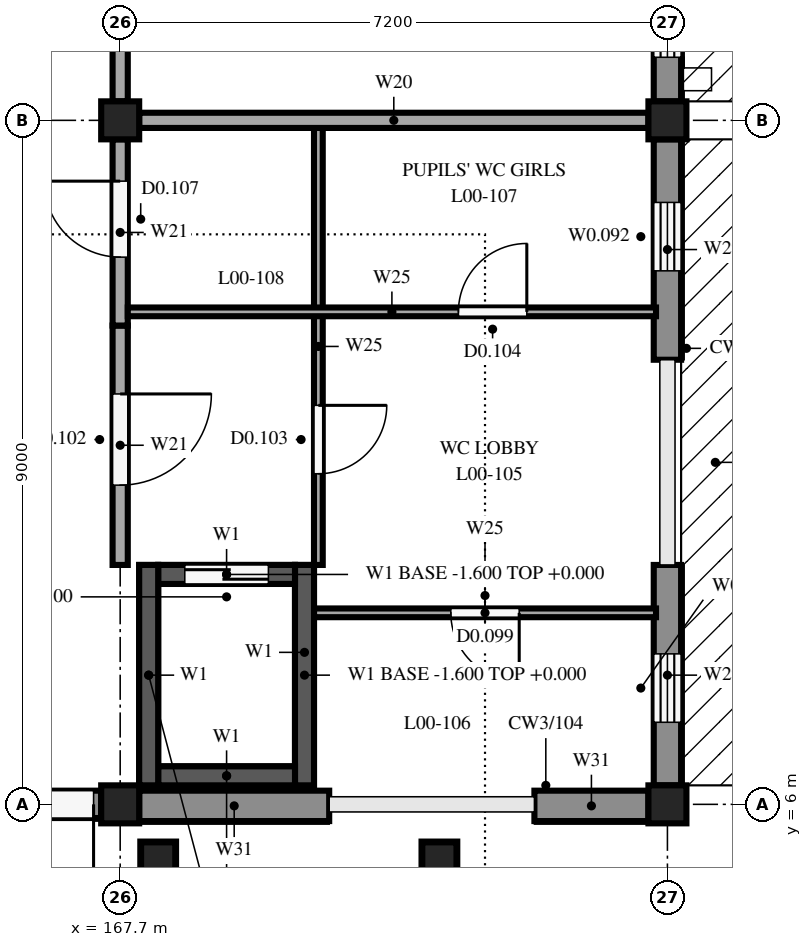
"""IFC4 building model, lengths in metres.
Left out: names, types, materials, properties, quantities, classifications, styles, units other than length and angle.
Written with IfcOpenShell. Run it as: python <this file> out.ifc"""

import sys

from ifc_helpers import new_model, si_unit, direction, frame, frame_2d, origin, origin_2d, place, context, subcontext, project, spatial, rectangle, extrude, element, fill, save


model = new_model("IFC4")
c1 = context("Model", 3, precision=1e-05, world=origin(), true_north=direction((0.0, 1.0)))
c2 = subcontext(c1, "Body", "Model", "MODEL_VIEW")
j1 = project(units=[si_unit("LENGTHUNIT", "METRE"), si_unit("PLANEANGLEUNIT", "RADIAN")], contexts=[c1])
p1 = place(None, origin())
s1 = spatial("IfcSite", under=j1, at=p1, CompositionType="ELEMENT")
p2 = place(p1, origin())
s2 = spatial("IfcBuilding", under=s1, at=p2, CompositionType="ELEMENT")
p3 = place(p2, origin())
s3 = spatial("IfcBuildingStorey", under=s2, at=p3, CompositionType="ELEMENT", Elevation=0.0)
for number, where, z_axis, x_axis in (
    (1, (167.7, 6.0, 0.0), (0.0, 0.0, 1.0), (1.0, 0.0, 0.0)),
    (2, (167.7, 15.0, 0.0), (0.0, 0.0, 1.0), (1.0, 0.0, 0.0)),
    (3, (174.9, 6.0, 0.0), (0.0, 0.0, 1.0), (1.0, 0.0, 0.0)),
    (4, (174.9, 15.0, 0.0), (0.0, 0.0, 1.0), (1.0, 0.0, 0.0)),
):
    element("IfcColumn", number, at=place(p3, frame(where, z_axis=z_axis, x_axis=x_axis)), inside=s3, PredefinedType="COLUMN", context=c2, shape_type="SweptSolid", body=[
        extrude(rectangle(XDim=0.5, YDim=0.5, at=origin_2d()), origin(), (0.0, 0.0, 1.0), 4.25),
    ])
for number, where, z_axis, x_axis in (
    (5, (168.075, 6.25, 0.0), (0.0, 0.0, 1.0), (0.0, 1.0, 0.0)),
    (6, (170.125, 6.25, 0.0), (0.0, 0.0, 1.0), (0.0, 1.0, 0.0)),
):
    element("IfcWall", number, at=place(p3, frame(where, z_axis=z_axis, x_axis=x_axis)), inside=s3, PredefinedType="SHEAR", context=c2, shape_type="SweptSolid", body=[
        extrude(rectangle(XDim=2.9, YDim=0.25, at=frame_2d((1.45, 0.0))), origin(), (0.0, 0.0, 1.0), 4.25),
    ])
p4 = place(p3, frame((168.2, 6.375, 0.0), z_axis=(0.0, 0.0, 1.0), x_axis=(1.0, 0.0, 0.0)))
e7 = element("IfcWall", 7, at=p4, inside=s3, PredefinedType="SHEAR", context=c2, shape_type="SweptSolid", body=[
    extrude(rectangle(XDim=1.8, YDim=0.25, at=frame_2d((0.9, 0.0))), origin(), (0.0, 0.0, 1.0), 4.25),
])
p5 = place(p3, frame((168.2, 9.025, 0.0), z_axis=(0.0, 0.0, 1.0), x_axis=(1.0, 0.0, 0.0)))
e8 = element("IfcWall", 8, at=p5, inside=s3, PredefinedType="SHEAR", context=c2, shape_type="SweptSolid", body=[
    extrude(rectangle(XDim=1.8, YDim=0.25, at=frame_2d((0.9, 0.0))), origin(), (0.0, 0.0, 1.0), 4.25),
])
p6 = place(p5, frame((0.35, 0.0, 0.0)))
e9 = element("IfcOpeningElement", 9, at=p6, cuts=e8, PredefinedType="OPENING", context=c2, shape_type="SweptSolid", body=[
    extrude(rectangle(XDim=1.1, YDim=2.1, at=frame_2d((0.55, 1.05))), frame((0.0, 0.135, 0.0), z_axis=(0.0, -1.0, 0.0), x_axis=(1.0, 0.0, 0.0)), (0.0, 0.0, 1.0), 0.27),
])
for number, where, z_axis, x_axis in (
    (10, (168.075, 6.25, -1.6), (0.0, 0.0, 1.0), (0.0, 1.0, 0.0)),
    (11, (170.125, 6.25, -1.6), (0.0, 0.0, 1.0), (0.0, 1.0, 0.0)),
):
    element("IfcWall", number, at=place(p3, frame(where, z_axis=z_axis, x_axis=x_axis)), inside=s3, PredefinedType="SHEAR", context=c2, shape_type="SweptSolid", body=[
        extrude(rectangle(XDim=2.9, YDim=0.25, at=frame_2d((1.45, 0.0))), origin(), (0.0, 0.0, 1.0), 1.6),
    ])
for number, where, z_axis, x_axis in (
    (12, (168.2, 6.375, -1.6), (0.0, 0.0, 1.0), (1.0, 0.0, 0.0)),
    (13, (168.2, 9.025, -1.6), (0.0, 0.0, 1.0), (1.0, 0.0, 0.0)),
):
    element("IfcWall", number, at=place(p3, frame(where, z_axis=z_axis, x_axis=x_axis)), inside=s3, PredefinedType="SHEAR", context=c2, shape_type="SweptSolid", body=[
        extrude(rectangle(XDim=1.8, YDim=0.25, at=frame_2d((0.9, 0.0))), origin(), (0.0, 0.0, 1.0), 1.6),
    ])
for number, where, z_axis, x_axis in (
    (14, (168.2, 5.275, -0.3), (0.0, 0.0, 1.0), (1.0, 0.0, 0.0)),
    (15, (171.9, 5.275, -0.3), (0.0, 0.0, 1.0), (1.0, 0.0, 0.0)),
):
    element("IfcColumn", number, at=place(p3, frame(where, z_axis=z_axis, x_axis=x_axis)), inside=s3, PredefinedType="COLUMN", context=c2, shape_type="SweptSolid", body=[
        extrude(rectangle(XDim=0.45, YDim=0.45, at=origin_2d()), origin(), (0.0, 0.0, 1.0), 3.95),
    ])
p7 = place(p3, frame((174.9, 9.15, 0.0), z_axis=(0.0, 0.0, 1.0), x_axis=(0.0, -1.0, 0.0)))
e16 = element("IfcWall", 16, at=p7, inside=s3, PredefinedType="STANDARD", context=c2, shape_type="SweptSolid", body=[
    extrude(rectangle(XDim=2.9, YDim=0.36, at=frame_2d((1.45, 0.0))), origin(), (0.0, 0.0, 1.0), 3.75),
])
p8 = place(p7, frame((1.17, 0.0, 1.6)))
e17 = element("IfcOpeningElement", 17, at=p8, cuts=e16, PredefinedType="OPENING", context=c2, shape_type="SweptSolid", body=[
    extrude(rectangle(XDim=0.9, YDim=1.0, at=frame_2d((0.45, 0.5))), frame((0.0, 0.19, 0.0), z_axis=(0.0, -1.0, 0.0), x_axis=(1.0, 0.0, 0.0)), (0.0, 0.0, 1.0), 0.38),
])
p9 = place(p3, frame((174.9, 14.75, 0.0), z_axis=(0.0, 0.0, 1.0), x_axis=(0.0, -1.0, 0.0)))
e18 = element("IfcWall", 18, at=p9, inside=s3, PredefinedType="STANDARD", context=c2, shape_type="SweptSolid", body=[
    extrude(rectangle(XDim=2.9, YDim=0.36, at=frame_2d((1.45, 0.0))), origin(), (0.0, 0.0, 1.0), 3.75),
])
p10 = place(p9, frame((0.83, 0.0, 1.6)))
e19 = element("IfcOpeningElement", 19, at=p10, cuts=e18, PredefinedType="OPENING", context=c2, shape_type="SweptSolid", body=[
    extrude(rectangle(XDim=0.9, YDim=1.0, at=frame_2d((0.45, 0.5))), frame((0.0, 0.19, 0.0), z_axis=(0.0, -1.0, 0.0), x_axis=(1.0, 0.0, 0.0)), (0.0, 0.0, 1.0), 0.38),
])
p11 = place(p3, frame((174.9, 23.75, 0.0), z_axis=(0.0, 0.0, 1.0), x_axis=(0.0, -1.0, 0.0)))
e20 = element("IfcWall", 20, at=p11, inside=s3, PredefinedType="STANDARD", context=c2, shape_type="SweptSolid", body=[
    extrude(rectangle(XDim=8.5, YDim=0.36, at=frame_2d((4.25, 0.0))), origin(), (0.0, 0.0, 1.0), 3.75),
])
p12 = place(p11, frame((6.52, 0.0, 0.6)))
e21 = element("IfcOpeningElement", 21, at=p12, cuts=e20, PredefinedType="OPENING", context=c2, shape_type="SweptSolid", body=[
    extrude(rectangle(XDim=1.4, YDim=3.0, at=frame_2d((0.7, 1.5))), frame((0.0, 0.19, 0.0), z_axis=(0.0, -1.0, 0.0), x_axis=(1.0, 0.0, 0.0)), (0.0, 0.0, 1.0), 0.38),
])
p13 = place(p11, frame((4.54, 0.0, 0.6)))
e22 = element("IfcOpeningElement", 22, at=p13, cuts=e20, PredefinedType="OPENING", context=c2, shape_type="SweptSolid", body=[
    extrude(rectangle(XDim=1.4, YDim=3.0, at=frame_2d((0.7, 1.5))), frame((0.0, 0.19, 0.0), z_axis=(0.0, -1.0, 0.0), x_axis=(1.0, 0.0, 0.0)), (0.0, 0.0, 1.0), 0.38),
])
p14 = place(p11, frame((2.56, 0.0, 0.6)))
e23 = element("IfcOpeningElement", 23, at=p14, cuts=e20, PredefinedType="OPENING", context=c2, shape_type="SweptSolid", body=[
    extrude(rectangle(XDim=1.4, YDim=3.0, at=frame_2d((0.7, 1.5))), frame((0.0, 0.19, 0.0), z_axis=(0.0, -1.0, 0.0), x_axis=(1.0, 0.0, 0.0)), (0.0, 0.0, 1.0), 0.38),
])
p15 = place(p11, frame((0.58, 0.0, 0.6)))
e24 = element("IfcOpeningElement", 24, at=p15, cuts=e20, PredefinedType="OPENING", context=c2, shape_type="SweptSolid", body=[
    extrude(rectangle(XDim=1.4, YDim=3.0, at=frame_2d((0.7, 1.5))), frame((0.0, 0.19, 0.0), z_axis=(0.0, -1.0, 0.0), x_axis=(1.0, 0.0, 0.0)), (0.0, 0.0, 1.0), 0.38),
])
p16 = place(p3, frame((167.45, 6.0, 0.0), z_axis=(0.0, 0.0, 1.0), x_axis=(-1.0, 0.0, 0.0)))
e25 = element("IfcWall", 25, at=p16, inside=s3, PredefinedType="STANDARD", context=c2, shape_type="SweptSolid", body=[
    extrude(rectangle(XDim=2.2, YDim=0.36, at=frame_2d((1.1, 0.0))), origin(), (0.0, 0.0, 1.0), 3.9),
])
p17 = place(p16, frame((0.1, 0.0, 0.0)))
e26 = element("IfcOpeningElement", 26, at=p17, cuts=e25, PredefinedType="OPENING", context=c2, shape_type="SweptSolid", body=[
    extrude(rectangle(XDim=2.0, YDim=2.4, at=frame_2d((1.0, 1.2))), frame((0.0, 0.19, 0.0), z_axis=(0.0, -1.0, 0.0), x_axis=(1.0, 0.0, 0.0)), (0.0, 0.0, 1.0), 0.38),
])
p18 = place(p3, frame((170.45, 5.98, 0.0), z_axis=(0.0, 0.0, 1.0), x_axis=(-1.0, 0.0, 0.0)))
e27 = element("IfcWall", 27, at=p18, inside=s3, PredefinedType="STANDARD", context=c2, shape_type="SweptSolid", body=[
    extrude(rectangle(XDim=2.5, YDim=0.4, at=frame_2d((1.25, 0.0))), origin(), (0.0, 0.0, 1.0), 3.8),
])
p19 = place(p3, frame((174.65, 5.98, 0.0), z_axis=(0.0, 0.0, 1.0), x_axis=(-1.0, 0.0, 0.0)))
e28 = element("IfcWall", 28, at=p19, inside=s3, PredefinedType="STANDARD", context=c2, shape_type="SweptSolid", body=[
    extrude(rectangle(XDim=1.5, YDim=0.4, at=frame_2d((0.75, 0.0))), origin(), (0.0, 0.0, 1.0), 3.8),
])
p20 = place(p3, frame((167.7, 12.3, 0.0), z_axis=(0.0, 0.0, 1.0), x_axis=(0.0, -1.0, 0.0)))
e29 = element("IfcWall", 29, at=p20, inside=s3, PredefinedType="PARTITIONING", context=c2, shape_type="SweptSolid", body=[
    extrude(rectangle(XDim=3.15, YDim=0.2, at=frame_2d((1.575, 0.0))), origin(), (0.0, 0.0, 1.0), 3.8),
])
p21 = place(p20, frame((0.9, 0.0, 0.0)))
e30 = element("IfcOpeningElement", 30, at=p21, cuts=e29, PredefinedType="OPENING", context=c2, shape_type="SweptSolid", body=[
    extrude(rectangle(XDim=1.2, YDim=2.1, at=frame_2d((0.6, 1.05))), frame((0.0, 0.11, 0.0), z_axis=(0.0, -1.0, 0.0), x_axis=(1.0, 0.0, 0.0)), (0.0, 0.0, 1.0), 0.22),
])
p22 = place(p3, frame((167.7, 12.3, 0.0), z_axis=(0.0, 0.0, 1.0), x_axis=(0.0, 1.0, 0.0)))
e31 = element("IfcWall", 31, at=p22, inside=s3, PredefinedType="PARTITIONING", context=c2, shape_type="SweptSolid", body=[
    extrude(rectangle(XDim=2.45, YDim=0.2, at=frame_2d((1.225, 0.0))), origin(), (0.0, 0.0, 1.0), 3.8),
])
p23 = place(p22, frame((0.9, 0.0, 0.0)))
e32 = element("IfcOpeningElement", 32, at=p23, cuts=e31, PredefinedType="OPENING", context=c2, shape_type="SweptSolid", body=[
    extrude(rectangle(XDim=1.0, YDim=2.1, at=frame_2d((0.5, 1.05))), frame((0.0, 0.11, 0.0), z_axis=(0.0, -1.0, 0.0), x_axis=(1.0, 0.0, 0.0)), (0.0, 0.0, 1.0), 0.22),
])
p24 = place(p3, frame((167.95, 15.0, 0.0), z_axis=(0.0, 0.0, 1.0), x_axis=(1.0, 0.0, 0.0)))
e33 = element("IfcWall", 33, at=p24, inside=s3, PredefinedType="PARTITIONING", context=c2, shape_type="SweptSolid", body=[
    extrude(rectangle(XDim=6.7, YDim=0.2, at=frame_2d((3.35, 0.0))), origin(), (0.0, 0.0, 1.0), 3.8),
])
p25 = place(p3, frame((170.308, 14.9, 0.0), z_axis=(0.0, 0.0, 1.0), x_axis=(0.0, -1.0, 0.0)))
e34 = element("IfcWall", 34, at=p25, inside=s3, PredefinedType="PARTITIONING", context=c2, shape_type="SweptSolid", body=[
    extrude(rectangle(XDim=5.75, YDim=0.115, at=frame_2d((2.875, 0.0))), origin(), (0.0, 0.0, 1.0), 4.25),
])
p26 = place(p25, frame((3.65, 0.0, 0.0)))
e35 = element("IfcOpeningElement", 35, at=p26, cuts=e34, PredefinedType="OPENING", context=c2, shape_type="SweptSolid", body=[
    extrude(rectangle(XDim=0.9, YDim=2.1, at=frame_2d((0.45, 1.05))), frame((0.0, 0.067, 0.0), z_axis=(0.0, -1.0, 0.0), x_axis=(1.0, 0.0, 0.0)), (0.0, 0.0, 1.0), 0.135),
])
p27 = place(p3, frame((174.75, 8.52, 0.0), z_axis=(0.0, 0.0, 1.0), x_axis=(-1.0, 0.0, 0.0)))
e36 = element("IfcWall", 36, at=p27, inside=s3, PredefinedType="PARTITIONING", context=c2, shape_type="SweptSolid", body=[
    extrude(rectangle(XDim=4.5, YDim=0.115, at=frame_2d((2.25, 0.0))), origin(), (0.0, 0.0, 1.0), 4.25),
])
p28 = place(p27, frame((1.8, 0.0, 0.0)))
e37 = element("IfcOpeningElement", 37, at=p28, cuts=e36, PredefinedType="OPENING", context=c2, shape_type="SweptSolid", body=[
    extrude(rectangle(XDim=0.9, YDim=2.1, at=frame_2d((0.45, 1.05))), frame((0.0, 0.067, 0.0), z_axis=(0.0, -1.0, 0.0), x_axis=(1.0, 0.0, 0.0)), (0.0, 0.0, 1.0), 0.135),
])
p29 = place(p3, frame((167.8, 12.48, 0.0), z_axis=(0.0, 0.0, 1.0), x_axis=(1.0, 0.0, 0.0)))
e38 = element("IfcWall", 38, at=p29, inside=s3, PredefinedType="PARTITIONING", context=c2, shape_type="SweptSolid", body=[
    extrude(rectangle(XDim=6.95, YDim=0.115, at=frame_2d((3.475, 0.0))), origin(), (0.0, 0.0, 1.0), 4.25),
])
p30 = place(p29, frame((4.35, 0.0, 0.0)))
e39 = element("IfcOpeningElement", 39, at=p30, cuts=e38, PredefinedType="OPENING", context=c2, shape_type="SweptSolid", body=[
    extrude(rectangle(XDim=0.9, YDim=2.1, at=frame_2d((0.45, 1.05))), frame((0.0, 0.067, 0.0), z_axis=(0.0, -1.0, 0.0), x_axis=(1.0, 0.0, 0.0)), (0.0, 0.0, 1.0), 0.135),
])
p31 = place(p3, frame((167.7, 23.75, 0.0), z_axis=(0.0, 0.0, 1.0), x_axis=(0.0, -1.0, 0.0)))
e40 = element("IfcWall", 40, at=p31, inside=s3, PredefinedType="PARTITIONING", context=c2, shape_type="SweptSolid", body=[
    extrude(rectangle(XDim=8.5, YDim=0.2, at=frame_2d((4.25, 0.0))), origin(), (0.0, 0.0, 1.0), 3.8),
])
p32 = place(p31, frame((3.75, 0.0, 0.0)))
e41 = element("IfcOpeningElement", 41, at=p32, cuts=e40, PredefinedType="OPENING", context=c2, shape_type="SweptSolid", body=[
    extrude(rectangle(XDim=1.0, YDim=2.1, at=frame_2d((0.5, 1.05))), frame((0.0, 0.11, 0.0), z_axis=(0.0, -1.0, 0.0), x_axis=(1.0, 0.0, 0.0)), (0.0, 0.0, 1.0), 0.22),
])
p33 = place(p8, origin())
e42 = element("IfcWindow", 42, at=p33, inside=s3, PartitioningType="SINGLE_PANEL", PredefinedType="WINDOW", context=c2, shape_type="SweptSolid", body=[
    extrude(rectangle(XDim=0.9, YDim=1.0, at=frame_2d((0.45, 0.5))), frame((0.0, 0.03, 0.0), z_axis=(0.0, -1.0, 0.0), x_axis=(1.0, 0.0, 0.0)), (0.0, 0.0, 1.0), 0.06),
])
fill(e17, e42)
p34 = place(p10, origin())
e43 = element("IfcWindow", 43, at=p34, inside=s3, PartitioningType="SINGLE_PANEL", PredefinedType="WINDOW", context=c2, shape_type="SweptSolid", body=[
    extrude(rectangle(XDim=0.9, YDim=1.0, at=frame_2d((0.45, 0.5))), frame((0.0, 0.03, 0.0), z_axis=(0.0, -1.0, 0.0), x_axis=(1.0, 0.0, 0.0)), (0.0, 0.0, 1.0), 0.06),
])
fill(e19, e43)
p35 = place(p12, origin())
e44 = element("IfcWindow", 44, at=p35, inside=s3, PartitioningType="DOUBLE_PANEL_VERTICAL", PredefinedType="WINDOW", context=c2, shape_type="SweptSolid", body=[
    extrude(rectangle(XDim=1.4, YDim=3.0, at=frame_2d((0.7, 1.5))), frame((0.0, 0.03, 0.0), z_axis=(0.0, -1.0, 0.0), x_axis=(1.0, 0.0, 0.0)), (0.0, 0.0, 1.0), 0.06),
])
fill(e21, e44)
p36 = place(p17, origin())
e45 = element("IfcDoor", 45, at=p36, inside=s3, OperationType="DOUBLE_DOOR_SINGLE_SWING", PredefinedType="DOOR", context=c2, shape_type="SweptSolid", body=[
    extrude(rectangle(XDim=2.0, YDim=2.4, at=frame_2d((1.0, 1.2))), frame((0.0, 0.025, 0.0), z_axis=(0.0, -1.0, 0.0), x_axis=(1.0, 0.0, 0.0)), (0.0, 0.0, 1.0), 0.05),
])
fill(e26, e45)
p37 = place(p21, origin())
e46 = element("IfcDoor", 46, at=p37, inside=s3, OperationType="SINGLE_SWING_LEFT", PredefinedType="DOOR", context=c2, shape_type="SweptSolid", body=[
    extrude(rectangle(XDim=1.2, YDim=2.1, at=frame_2d((0.6, 1.05))), frame((0.0, 0.025, 0.0), z_axis=(0.0, -1.0, 0.0), x_axis=(1.0, 0.0, 0.0)), (0.0, 0.0, 1.0), 0.05),
])
fill(e30, e46)
p38 = place(p23, origin())
e47 = element("IfcDoor", 47, at=p38, inside=s3, OperationType="SINGLE_SWING_RIGHT", PredefinedType="DOOR", context=c2, shape_type="SweptSolid", body=[
    extrude(rectangle(XDim=1.0, YDim=2.1, at=frame_2d((0.5, 1.05))), frame((0.0, 0.025, 0.0), z_axis=(0.0, -1.0, 0.0), x_axis=(1.0, 0.0, 0.0)), (0.0, 0.0, 1.0), 0.05),
])
fill(e32, e47)
p39 = place(p26, origin())
e48 = element("IfcDoor", 48, at=p39, inside=s3, OperationType="SINGLE_SWING_LEFT", PredefinedType="DOOR", context=c2, shape_type="SweptSolid", body=[
    extrude(rectangle(XDim=0.9, YDim=2.1, at=frame_2d((0.45, 1.05))), frame((0.0, 0.025, 0.0), z_axis=(0.0, -1.0, 0.0), x_axis=(1.0, 0.0, 0.0)), (0.0, 0.0, 1.0), 0.05),
])
fill(e35, e48)
p40 = place(p28, origin())
e49 = element("IfcDoor", 49, at=p40, inside=s3, OperationType="SINGLE_SWING_LEFT", PredefinedType="DOOR", context=c2, shape_type="SweptSolid", body=[
    extrude(rectangle(XDim=0.9, YDim=2.1, at=frame_2d((0.45, 1.05))), frame((0.0, 0.025, 0.0), z_axis=(0.0, -1.0, 0.0), x_axis=(1.0, 0.0, 0.0)), (0.0, 0.0, 1.0), 0.05),
])
fill(e37, e49)
p41 = place(p30, origin())
e50 = element("IfcDoor", 50, at=p41, inside=s3, OperationType="SINGLE_SWING_RIGHT", PredefinedType="DOOR", context=c2, shape_type="SweptSolid", body=[
    extrude(rectangle(XDim=0.9, YDim=2.1, at=frame_2d((0.45, 1.05))), frame((0.0, 0.025, 0.0), z_axis=(0.0, -1.0, 0.0), x_axis=(1.0, 0.0, 0.0)), (0.0, 0.0, 1.0), 0.05),
])
fill(e39, e50)
p42 = place(p6, origin())
e51 = element("IfcDoor", 51, at=p42, inside=s3, OperationType="SLIDING_TO_LEFT", PredefinedType="DOOR", context=c2, shape_type="SweptSolid", body=[
    extrude(rectangle(XDim=1.1, YDim=2.1, at=frame_2d((0.55, 1.05))), frame((0.0, 0.025, 0.0), z_axis=(0.0, -1.0, 0.0), x_axis=(1.0, 0.0, 0.0)), (0.0, 0.0, 1.0), 0.05),
])
fill(e9, e51)
save(model, sys.argv[1])
